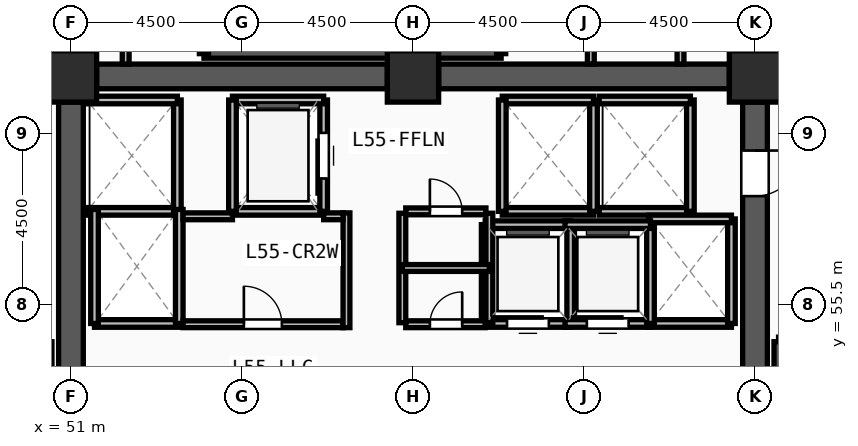
"""IFC4 building model, lengths in metres.
Left out: names, types, materials, properties, quantities, classifications, styles, units other than length and angle.
Written with IfcOpenShell. Run it as: python <this file> out.ifc"""

import sys

from ifc_helpers import new_model, si_unit, direction, frame, frame_2d, origin, origin_2d, place, context, subcontext, project, spatial, rectangle, extrude, source, transform, mapped, element, fill, save


model = new_model("IFC4")
c1 = context("Model", 3, precision=1e-05, world=origin(), true_north=direction((0.0, 1.0)))
c2 = subcontext(c1, "Body", "Model", "MODEL_VIEW")
j1 = project(units=[si_unit("LENGTHUNIT", "METRE"), si_unit("PLANEANGLEUNIT", "RADIAN")], contexts=[c1])
p1 = place(None, origin())
s1 = spatial("IfcSite", under=j1, at=p1, CompositionType="ELEMENT")
p2 = place(p1, origin())
s2 = spatial("IfcBuilding", under=s1, at=p2, CompositionType="ELEMENT")
p3 = place(p2, frame((0.0, 0.0, 213.0)))
s3 = spatial("IfcBuildingStorey", under=s2, at=p3, CompositionType="ELEMENT", Elevation=213.0)
m1 = source(origin(), c2, "Body", "SweptSolid", [
    extrude(rectangle(XDim=1.35, YDim=1.35, at=origin_2d()), origin(), (0.0, 0.0, 1.0), 3.75),
])
for number, where, z_axis, x_axis in (
    (1, (69.0, 61.5, 0.0), (0.0, 0.0, 1.0), (1.0, 0.0, 0.0)),
    (2, (60.0, 61.5, 0.0), (0.0, 0.0, 1.0), (1.0, 0.0, 0.0)),
    (3, (51.0, 61.5, 0.0), (0.0, 0.0, 1.0), (1.0, 0.0, 0.0)),
):
    element("IfcColumn", number, at=place(p3, frame(where, z_axis=z_axis, x_axis=x_axis)), inside=s3, PredefinedType="COLUMN", context=c2, shape_type="MappedRepresentation", body=[
        mapped(m1, transform((0.0, 0.0, 0.0), x_axis=(1.0, 0.0, 0.0), y_axis=(0.0, 1.0, 0.0), z_axis=(0.0, 0.0, 1.0), scale=1.0)),
    ])
for number, where, z_axis, x_axis in (
    (4, (51.675, 61.5, 0.0), (0.0, 0.0, 1.0), (1.0, 0.0, 0.0)),
    (5, (60.675, 61.5, 0.0), (0.0, 0.0, 1.0), (1.0, 0.0, 0.0)),
):
    element("IfcWall", number, at=place(p3, frame(where, z_axis=z_axis, x_axis=x_axis)), inside=s3, PredefinedType="SHEAR", context=c2, shape_type="SweptSolid", body=[
        extrude(rectangle(XDim=7.65, YDim=0.65, at=frame_2d((3.825, 0.0))), origin(), (0.0, 0.0, 1.0), 3.57),
    ])
p4 = place(p3, frame((69.0, 60.825, 0.0), z_axis=(0.0, 0.0, 1.0), x_axis=(0.0, -1.0, 0.0)))
e6 = element("IfcWall", 6, at=p4, inside=s3, PredefinedType="SHEAR", context=c2, shape_type="SweptSolid", body=[
    extrude(rectangle(XDim=13.65, YDim=0.65, at=frame_2d((6.825, 0.0))), origin(), (0.0, 0.0, 1.0), 3.57),
])
m2 = source(origin(), c2, "Body", "SweptSolid", [
    extrude(rectangle(XDim=1.2, YDim=2.2, at=frame_2d((0.6, 1.1))), frame((0.0, 0.335, 0.0), z_axis=(0.0, -1.0, 0.0), x_axis=(1.0, 0.0, 0.0)), (0.0, 0.0, 1.0), 0.67),
])
p5 = place(p4, frame((1.275, 0.0, 0.0)))
e7 = element("IfcOpeningElement", 7, at=p5, cuts=e6, PredefinedType="OPENING", context=c2, shape_type="MappedRepresentation", body=[
    mapped(m2, transform((0.0, 0.0, 0.0), x_axis=(1.0, 0.0, 0.0), y_axis=(0.0, 1.0, 0.0), z_axis=(0.0, 0.0, 1.0), scale=1.0)),
])
p6 = place(p3, frame((51.0, 47.175, 0.0), z_axis=(0.0, 0.0, 1.0), x_axis=(0.0, 1.0, 0.0)))
e8 = element("IfcWall", 8, at=p6, inside=s3, PredefinedType="SHEAR", context=c2, shape_type="SweptSolid", body=[
    extrude(rectangle(XDim=13.65, YDim=0.65, at=frame_2d((6.825, 0.0))), origin(), (0.0, 0.0, 1.0), 3.57),
])
for number, where, z_axis, x_axis in (
    (9, (69.62, 54.52, 0.0), (0.0, 0.0, 1.0), (0.0, -1.0, 0.0)),
    (10, (54.5, 62.1, 0.0), (0.0, 0.0, 1.0), (1.0, 0.0, 0.0)),
):
    element("IfcWall", number, at=place(p3, frame(where, z_axis=z_axis, x_axis=x_axis)), inside=s3, PredefinedType="SOLIDWALL", context=c2, shape_type="SweptSolid", body=[
        extrude(rectangle(XDim=7.82, YDim=0.24, at=frame_2d((3.91, 0.0))), origin(), (0.0, 0.0, 1.0), 3.57),
    ])
for number, where, z_axis, x_axis in (
    (11, (62.32, 62.1, 0.0), (0.0, 0.0, 1.0), (0.0, 1.0, 0.0)),
    (12, (54.5, 65.54, 0.0), (0.0, 0.0, 1.0), (0.0, -1.0, 0.0)),
):
    element("IfcWall", number, at=place(p3, frame(where, z_axis=z_axis, x_axis=x_axis)), inside=s3, PredefinedType="SOLIDWALL", context=c2, shape_type="SweptSolid", body=[
        extrude(rectangle(XDim=3.44, YDim=0.24, at=frame_2d((1.72, 0.0))), origin(), (0.0, 0.0, 1.0), 3.57),
    ])
p7 = place(p3, frame((55.25, 57.95, 0.0), z_axis=(0.0, 0.0, 1.0), x_axis=(1.0, 0.0, 0.0)))
e13 = element("IfcWall", 13, at=p7, inside=s3, PredefinedType="SOLIDWALL", context=c2, shape_type="SweptSolid", body=[
    extrude(rectangle(XDim=2.4, YDim=0.2, at=frame_2d((1.2, 0.0))), origin(), (0.0, 0.0, 1.0), 3.57),
])
p8 = place(p3, frame((57.65, 57.95, 0.0), z_axis=(0.0, 0.0, 1.0), x_axis=(0.0, 1.0, 0.0)))
e14 = element("IfcWall", 14, at=p8, inside=s3, PredefinedType="SOLIDWALL", context=c2, shape_type="SweptSolid", body=[
    extrude(rectangle(XDim=2.93, YDim=0.2, at=frame_2d((1.465, 0.0))), origin(), (0.0, 0.0, 1.0), 3.57),
])
m3 = source(origin(), c2, "Body", "SweptSolid", [
    extrude(rectangle(XDim=1.2, YDim=2.3, at=frame_2d((0.6, 1.15))), frame((0.0, 0.11, 0.0), z_axis=(0.0, -1.0, 0.0), x_axis=(1.0, 0.0, 0.0)), (0.0, 0.0, 1.0), 0.22),
])
p9 = place(p8, frame((0.865, 0.0, 0.0)))
e15 = element("IfcOpeningElement", 15, at=p9, cuts=e14, PredefinedType="OPENING", context=c2, shape_type="MappedRepresentation", body=[
    mapped(m3, transform((0.0, 0.0, 0.0), x_axis=(1.0, 0.0, 0.0), y_axis=(0.0, 1.0, 0.0), z_axis=(0.0, 0.0, 1.0), scale=1.0)),
])
p10 = place(p3, frame((57.65, 60.88, 0.0), z_axis=(0.0, 0.0, 1.0), x_axis=(-1.0, 0.0, 0.0)))
e16 = element("IfcWall", 16, at=p10, inside=s3, PredefinedType="SOLIDWALL", context=c2, shape_type="SweptSolid", body=[
    extrude(rectangle(XDim=2.4, YDim=0.2, at=frame_2d((1.2, 0.0))), origin(), (0.0, 0.0, 1.0), 3.57),
])
p11 = place(p3, frame((55.25, 60.88, 0.0), z_axis=(0.0, 0.0, 1.0), x_axis=(0.0, -1.0, 0.0)))
e17 = element("IfcWall", 17, at=p11, inside=s3, PredefinedType="SOLIDWALL", context=c2, shape_type="SweptSolid", body=[
    extrude(rectangle(XDim=2.93, YDim=0.2, at=frame_2d((1.465, 0.0))), origin(), (0.0, 0.0, 1.0), 3.57),
])
p12 = place(p3, frame((62.35, 57.95, 0.0), z_axis=(0.0, 0.0, 1.0), x_axis=(1.0, 0.0, 0.0)))
e18 = element("IfcWall", 18, at=p12, inside=s3, PredefinedType="SOLIDWALL", context=c2, shape_type="SweptSolid", body=[
    extrude(rectangle(XDim=2.4, YDim=0.2, at=frame_2d((1.2, 0.0))), origin(), (0.0, 0.0, 1.0), 3.57),
])
p13 = place(p3, frame((64.75, 57.95, 0.0), z_axis=(0.0, 0.0, 1.0), x_axis=(0.0, 1.0, 0.0)))
e19 = element("IfcWall", 19, at=p13, inside=s3, PredefinedType="SOLIDWALL", context=c2, shape_type="SweptSolid", body=[
    extrude(rectangle(XDim=2.93, YDim=0.2, at=frame_2d((1.465, 0.0))), origin(), (0.0, 0.0, 1.0), 3.57),
])
p14 = place(p3, frame((64.75, 60.88, 0.0), z_axis=(0.0, 0.0, 1.0), x_axis=(-1.0, 0.0, 0.0)))
e20 = element("IfcWall", 20, at=p14, inside=s3, PredefinedType="SOLIDWALL", context=c2, shape_type="SweptSolid", body=[
    extrude(rectangle(XDim=2.4, YDim=0.2, at=frame_2d((1.2, 0.0))), origin(), (0.0, 0.0, 1.0), 3.57),
])
p15 = place(p3, frame((62.35, 60.88, 0.0), z_axis=(0.0, 0.0, 1.0), x_axis=(0.0, -1.0, 0.0)))
e21 = element("IfcWall", 21, at=p15, inside=s3, PredefinedType="SOLIDWALL", context=c2, shape_type="SweptSolid", body=[
    extrude(rectangle(XDim=2.93, YDim=0.2, at=frame_2d((1.465, 0.0))), origin(), (0.0, 0.0, 1.0), 3.57),
])
p16 = place(p3, frame((64.9, 57.95, 0.0), z_axis=(0.0, 0.0, 1.0), x_axis=(1.0, 0.0, 0.0)))
e22 = element("IfcWall", 22, at=p16, inside=s3, PredefinedType="SOLIDWALL", context=c2, shape_type="SweptSolid", body=[
    extrude(rectangle(XDim=2.4, YDim=0.2, at=frame_2d((1.2, 0.0))), origin(), (0.0, 0.0, 1.0), 3.57),
])
p17 = place(p3, frame((67.3, 57.95, 0.0), z_axis=(0.0, 0.0, 1.0), x_axis=(0.0, 1.0, 0.0)))
e23 = element("IfcWall", 23, at=p17, inside=s3, PredefinedType="SOLIDWALL", context=c2, shape_type="SweptSolid", body=[
    extrude(rectangle(XDim=2.93, YDim=0.2, at=frame_2d((1.465, 0.0))), origin(), (0.0, 0.0, 1.0), 3.57),
])
for number, where, z_axis, x_axis in (
    (24, (67.3, 60.88, 0.0), (0.0, 0.0, 1.0), (-1.0, 0.0, 0.0)),
    (25, (51.4, 57.95, 0.0), (0.0, 0.0, 1.0), (1.0, 0.0, 0.0)),
):
    element("IfcWall", number, at=place(p3, frame(where, z_axis=z_axis, x_axis=x_axis)), inside=s3, PredefinedType="SOLIDWALL", context=c2, shape_type="SweptSolid", body=[
        extrude(rectangle(XDim=2.4, YDim=0.2, at=frame_2d((1.2, 0.0))), origin(), (0.0, 0.0, 1.0), 3.57),
    ])
p18 = place(p3, frame((53.8, 57.95, 0.0), z_axis=(0.0, 0.0, 1.0), x_axis=(0.0, 1.0, 0.0)))
e26 = element("IfcWall", 26, at=p18, inside=s3, PredefinedType="SOLIDWALL", context=c2, shape_type="SweptSolid", body=[
    extrude(rectangle(XDim=2.93, YDim=0.2, at=frame_2d((1.465, 0.0))), origin(), (0.0, 0.0, 1.0), 3.57),
])
p19 = place(p3, frame((53.8, 60.88, 0.0), z_axis=(0.0, 0.0, 1.0), x_axis=(-1.0, 0.0, 0.0)))
e27 = element("IfcWall", 27, at=p19, inside=s3, PredefinedType="SOLIDWALL", context=c2, shape_type="SweptSolid", body=[
    extrude(rectangle(XDim=2.4, YDim=0.2, at=frame_2d((1.2, 0.0))), origin(), (0.0, 0.0, 1.0), 3.57),
])
p20 = place(p3, frame((51.62, 55.0, 0.0), z_axis=(0.0, 0.0, 1.0), x_axis=(1.0, 0.0, 0.0)))
e28 = element("IfcWall", 28, at=p20, inside=s3, PredefinedType="SOLIDWALL", context=c2, shape_type="SweptSolid", body=[
    extrude(rectangle(XDim=2.23, YDim=0.2, at=frame_2d((1.115, 0.0))), origin(), (0.0, 0.0, 1.0), 3.57),
])
for number, where, z_axis, x_axis in (
    (29, (53.85, 55.0, 0.0), (0.0, 0.0, 1.0), (0.0, 1.0, 0.0)),
    (30, (51.62, 58.0, 0.0), (0.0, 0.0, 1.0), (0.0, -1.0, 0.0)),
):
    element("IfcWall", number, at=place(p3, frame(where, z_axis=z_axis, x_axis=x_axis)), inside=s3, PredefinedType="SOLIDWALL", context=c2, shape_type="SweptSolid", body=[
        extrude(rectangle(XDim=3.0, YDim=0.2, at=frame_2d((1.5, 0.0))), origin(), (0.0, 0.0, 1.0), 3.57),
    ])
p21 = place(p3, frame((66.2, 55.0, 0.0), z_axis=(0.0, 0.0, 1.0), x_axis=(1.0, 0.0, 0.0)))
e31 = element("IfcWall", 31, at=p21, inside=s3, PredefinedType="SOLIDWALL", context=c2, shape_type="SweptSolid", body=[
    extrude(rectangle(XDim=2.18, YDim=0.2, at=frame_2d((1.09, 0.0))), origin(), (0.0, 0.0, 1.0), 3.57),
])
p22 = place(p3, frame((68.38, 55.0, 0.0), z_axis=(0.0, 0.0, 1.0), x_axis=(0.0, 1.0, 0.0)))
e32 = element("IfcWall", 32, at=p22, inside=s3, PredefinedType="SOLIDWALL", context=c2, shape_type="SweptSolid", body=[
    extrude(rectangle(XDim=2.75, YDim=0.2, at=frame_2d((1.375, 0.0))), origin(), (0.0, 0.0, 1.0), 3.57),
])
p23 = place(p3, frame((68.38, 57.75, 0.0), z_axis=(0.0, 0.0, 1.0), x_axis=(-1.0, 0.0, 0.0)))
e33 = element("IfcWall", 33, at=p23, inside=s3, PredefinedType="SOLIDWALL", context=c2, shape_type="SweptSolid", body=[
    extrude(rectangle(XDim=2.18, YDim=0.2, at=frame_2d((1.09, 0.0))), origin(), (0.0, 0.0, 1.0), 3.57),
])
p24 = place(p3, frame((61.9, 55.0, 0.0), z_axis=(0.0, 0.0, 1.0), x_axis=(1.0, 0.0, 0.0)))
e34 = element("IfcWall", 34, at=p24, inside=s3, PredefinedType="SOLIDWALL", context=c2, shape_type="SweptSolid", body=[
    extrude(rectangle(XDim=2.25, YDim=0.2, at=frame_2d((1.125, 0.0))), origin(), (0.0, 0.0, 1.0), 3.57),
])
m4 = source(origin(), c2, "Body", "SweptSolid", [
    extrude(rectangle(XDim=1.1, YDim=2.2, at=frame_2d((0.55, 1.1))), frame((0.0, 0.11, 0.0), z_axis=(0.0, -1.0, 0.0), x_axis=(1.0, 0.0, 0.0)), (0.0, 0.0, 1.0), 0.22),
])
p25 = place(p24, frame((0.575, 0.0, 0.0)))
e35 = element("IfcOpeningElement", 35, at=p25, cuts=e34, PredefinedType="OPENING", context=c2, shape_type="MappedRepresentation", body=[
    mapped(m4, transform((0.0, 0.0, 0.0), x_axis=(1.0, 0.0, 0.0), y_axis=(0.0, 1.0, 0.0), z_axis=(0.0, 0.0, 1.0), scale=1.0)),
])
p26 = place(p3, frame((64.15, 55.0, 0.0), z_axis=(0.0, 0.0, 1.0), x_axis=(0.0, 1.0, 0.0)))
e36 = element("IfcWall", 36, at=p26, inside=s3, PredefinedType="SOLIDWALL", context=c2, shape_type="SweptSolid", body=[
    extrude(rectangle(XDim=2.6, YDim=0.2, at=frame_2d((1.3, 0.0))), origin(), (0.0, 0.0, 1.0), 3.57),
])
p27 = place(p3, frame((64.15, 57.6, 0.0), z_axis=(0.0, 0.0, 1.0), x_axis=(-1.0, 0.0, 0.0)))
e37 = element("IfcWall", 37, at=p27, inside=s3, PredefinedType="SOLIDWALL", context=c2, shape_type="SweptSolid", body=[
    extrude(rectangle(XDim=2.25, YDim=0.2, at=frame_2d((1.125, 0.0))), origin(), (0.0, 0.0, 1.0), 3.57),
])
p28 = place(p3, frame((61.9, 57.6, 0.0), z_axis=(0.0, 0.0, 1.0), x_axis=(0.0, -1.0, 0.0)))
e38 = element("IfcWall", 38, at=p28, inside=s3, PredefinedType="SOLIDWALL", context=c2, shape_type="SweptSolid", body=[
    extrude(rectangle(XDim=2.6, YDim=0.2, at=frame_2d((1.3, 0.0))), origin(), (0.0, 0.0, 1.0), 3.57),
])
p29 = place(p3, frame((64.0, 55.0, 0.0), z_axis=(0.0, 0.0, 1.0), x_axis=(1.0, 0.0, 0.0)))
e39 = element("IfcWall", 39, at=p29, inside=s3, PredefinedType="SOLIDWALL", context=c2, shape_type="SweptSolid", body=[
    extrude(rectangle(XDim=2.25, YDim=0.2, at=frame_2d((1.125, 0.0))), origin(), (0.0, 0.0, 1.0), 3.57),
])
p30 = place(p29, frame((0.575, 0.0, 0.0)))
e40 = element("IfcOpeningElement", 40, at=p30, cuts=e39, PredefinedType="OPENING", context=c2, shape_type="MappedRepresentation", body=[
    mapped(m4, transform((0.0, 0.0, 0.0), x_axis=(1.0, 0.0, 0.0), y_axis=(0.0, 1.0, 0.0), z_axis=(0.0, 0.0, 1.0), scale=1.0)),
])
p31 = place(p3, frame((66.25, 55.0, 0.0), z_axis=(0.0, 0.0, 1.0), x_axis=(0.0, 1.0, 0.0)))
e41 = element("IfcWall", 41, at=p31, inside=s3, PredefinedType="SOLIDWALL", context=c2, shape_type="SweptSolid", body=[
    extrude(rectangle(XDim=2.6, YDim=0.2, at=frame_2d((1.3, 0.0))), origin(), (0.0, 0.0, 1.0), 3.57),
])
p32 = place(p3, frame((66.25, 57.6, 0.0), z_axis=(0.0, 0.0, 1.0), x_axis=(-1.0, 0.0, 0.0)))
e42 = element("IfcWall", 42, at=p32, inside=s3, PredefinedType="SOLIDWALL", context=c2, shape_type="SweptSolid", body=[
    extrude(rectangle(XDim=2.25, YDim=0.2, at=frame_2d((1.125, 0.0))), origin(), (0.0, 0.0, 1.0), 3.57),
])
p33 = place(p3, frame((53.95, 54.98, 0.0), z_axis=(0.0, 0.0, 1.0), x_axis=(1.0, 0.0, 0.0)))
e43 = element("IfcWall", 43, at=p33, inside=s3, PredefinedType="PARTITIONING", context=c2, shape_type="SweptSolid", body=[
    extrude(rectangle(XDim=4.21, YDim=0.18, at=frame_2d((2.105, 0.0))), origin(), (0.0, 0.0, 1.0), 3.57),
])
m5 = source(origin(), c2, "Body", "SweptSolid", [
    extrude(rectangle(XDim=1.0, YDim=2.2, at=frame_2d((0.5, 1.1))), frame((0.0, 0.1, 0.0), z_axis=(0.0, -1.0, 0.0), x_axis=(1.0, 0.0, 0.0)), (0.0, 0.0, 1.0), 0.2),
])
p34 = place(p33, frame((1.6, 0.0, 0.0)))
e44 = element("IfcOpeningElement", 44, at=p34, cuts=e43, PredefinedType="OPENING", context=c2, shape_type="MappedRepresentation", body=[
    mapped(m5, transform((0.0, 0.0, 0.0), x_axis=(1.0, 0.0, 0.0), y_axis=(0.0, 1.0, 0.0), z_axis=(0.0, 0.0, 1.0), scale=1.0)),
])
p35 = place(p3, frame((59.81, 54.98, 0.0), z_axis=(0.0, 0.0, 1.0), x_axis=(1.0, 0.0, 0.0)))
e45 = element("IfcWall", 45, at=p35, inside=s3, PredefinedType="PARTITIONING", context=c2, shape_type="SweptSolid", body=[
    extrude(rectangle(XDim=2.09, YDim=0.18, at=frame_2d((1.045, 0.0))), origin(), (0.0, 0.0, 1.0), 3.57),
])
m6 = source(origin(), c2, "Body", "SweptSolid", [
    extrude(rectangle(XDim=0.85, YDim=2.1, at=frame_2d((0.425, 1.05))), frame((0.0, 0.1, 0.0), z_axis=(0.0, -1.0, 0.0), x_axis=(1.0, 0.0, 0.0)), (0.0, 0.0, 1.0), 0.2),
])
p36 = place(p35, frame((0.635, 0.0, 0.0)))
e46 = element("IfcOpeningElement", 46, at=p36, cuts=e45, PredefinedType="OPENING", context=c2, shape_type="MappedRepresentation", body=[
    mapped(m6, transform((0.0, 0.0, 0.0), x_axis=(1.0, 0.0, 0.0), y_axis=(0.0, 1.0, 0.0), z_axis=(0.0, 0.0, 1.0), scale=1.0)),
])
p37 = place(p3, frame((59.81, 57.95, 0.0), z_axis=(0.0, 0.0, 1.0), x_axis=(1.0, 0.0, 0.0)))
e47 = element("IfcWall", 47, at=p37, inside=s3, PredefinedType="PARTITIONING", context=c2, shape_type="SweptSolid", body=[
    extrude(rectangle(XDim=2.11, YDim=0.18, at=frame_2d((1.055, 0.0))), origin(), (0.0, 0.0, 1.0), 3.57),
])
p38 = place(p37, frame((0.635, 0.0, 0.0)))
e48 = element("IfcOpeningElement", 48, at=p38, cuts=e47, PredefinedType="OPENING", context=c2, shape_type="MappedRepresentation", body=[
    mapped(m6, transform((0.0, 0.0, 0.0), x_axis=(1.0, 0.0, 0.0), y_axis=(0.0, 1.0, 0.0), z_axis=(0.0, 0.0, 1.0), scale=1.0)),
])
for number, where, z_axis, x_axis in (
    (49, (59.72, 55.02, 0.0), (0.0, 0.0, 1.0), (0.0, 1.0, 0.0)),
    (50, (62.01, 55.02, 0.0), (0.0, 0.0, 1.0), (0.0, 1.0, 0.0)),
):
    element("IfcWall", number, at=place(p3, frame(where, z_axis=z_axis, x_axis=x_axis)), inside=s3, PredefinedType="PARTITIONING", context=c2, shape_type="SweptSolid", body=[
        extrude(rectangle(XDim=2.88, YDim=0.18, at=frame_2d((1.44, 0.0))), origin(), (0.0, 0.0, 1.0), 3.57),
    ])
p39 = place(p3, frame((59.72, 56.46, 0.0), z_axis=(0.0, 0.0, 1.0), x_axis=(1.0, 0.0, 0.0)))
e51 = element("IfcWall", 51, at=p39, inside=s3, PredefinedType="PARTITIONING", context=c2, shape_type="SweptSolid", body=[
    extrude(rectangle(XDim=2.29, YDim=0.18, at=frame_2d((1.145, 0.0))), origin(), (0.0, 0.0, 1.0), 3.57),
])
p40 = place(p3, frame((50.54, 61.95, 0.0), z_axis=(0.0, 0.0, 1.0), x_axis=(0.0, 1.0, 0.0)))
e52 = element("IfcWall", 52, at=p40, inside=s3, PredefinedType="PARTITIONING", context=c2, shape_type="SweptSolid", body=[
    extrude(rectangle(XDim=3.63, YDim=0.18, at=frame_2d((1.815, 0.0))), origin(), (0.0, 0.0, 1.0), 3.57),
])
for number, where, z_axis, x_axis in (
    (53, (52.44, 61.825, 0.0), (0.0, 0.0, 1.0), (0.0, 1.0, 0.0)),
    (54, (64.68, 61.825, 0.0), (0.0, 0.0, 1.0), (0.0, 1.0, 0.0)),
    (55, (67.04, 61.825, 0.0), (0.0, 0.0, 1.0), (0.0, 1.0, 0.0)),
):
    element("IfcWall", number, at=place(p3, frame(where, z_axis=z_axis, x_axis=x_axis)), inside=s3, PredefinedType="PARTITIONING", context=c2, shape_type="SweptSolid", body=[
        extrude(rectangle(XDim=3.755, YDim=0.18, at=frame_2d((1.877, 0.0))), origin(), (0.0, 0.0, 1.0), 3.57),
    ])
p41 = place(p3, frame((69.46, 61.95, 0.0), z_axis=(0.0, 0.0, 1.0), x_axis=(0.0, 1.0, 0.0)))
e56 = element("IfcWall", 56, at=p41, inside=s3, PredefinedType="PARTITIONING", context=c2, shape_type="SweptSolid", body=[
    extrude(rectangle(XDim=3.63, YDim=0.18, at=frame_2d((1.815, 0.0))), origin(), (0.0, 0.0, 1.0), 3.57),
])
p42 = place(p3, frame((58.25, 54.89, 0.0), z_axis=(0.0, 0.0, 1.0), x_axis=(0.0, 1.0, 0.0)))
e57 = element("IfcWall", 57, at=p42, inside=s3, PredefinedType="PARTITIONING", context=c2, shape_type="SweptSolid", body=[
    extrude(rectangle(XDim=3.02, YDim=0.18, at=frame_2d((1.51, 0.0))), origin(), (0.0, 0.0, 1.0), 3.57),
])
p43 = place(p3, frame((53.95, 57.82, 0.0), z_axis=(0.0, 0.0, 1.0), x_axis=(1.0, 0.0, 0.0)))
e58 = element("IfcWall", 58, at=p43, inside=s3, PredefinedType="PARTITIONING", context=c2, shape_type="SweptSolid", body=[
    extrude(rectangle(XDim=1.3, YDim=0.18, at=frame_2d((0.65, 0.0))), origin(), (0.0, 0.0, 1.0), 3.57),
])
p44 = place(p3, frame((57.65, 57.82, 0.0), z_axis=(0.0, 0.0, 1.0), x_axis=(1.0, 0.0, 0.0)))
e59 = element("IfcWall", 59, at=p44, inside=s3, PredefinedType="PARTITIONING", context=c2, shape_type="SweptSolid", body=[
    extrude(rectangle(XDim=0.51, YDim=0.18, at=frame_2d((0.255, 0.0))), origin(), (0.0, 0.0, 1.0), 3.57),
])
m7 = source(origin(), c2, "Body", "SweptSolid", [
    extrude(rectangle(XDim=1.2, YDim=2.2, at=frame_2d((0.6, 1.1))), frame((0.0, 0.025, 0.0), z_axis=(0.0, -1.0, 0.0), x_axis=(1.0, 0.0, 0.0)), (0.0, 0.0, 1.0), 0.05),
])
p45 = place(p5, origin())
e60 = element("IfcDoor", 60, at=p45, inside=s3, OperationType="SINGLE_SWING_LEFT", PredefinedType="DOOR", context=c2, shape_type="MappedRepresentation", body=[
    mapped(m7, transform((0.0, 0.0, 0.0), x_axis=(1.0, 0.0, 0.0), y_axis=(0.0, 1.0, 0.0), z_axis=(0.0, 0.0, 1.0), scale=1.0)),
])
fill(e7, e60)
m8 = source(origin(), c2, "Body", "SweptSolid", [
    extrude(rectangle(XDim=1.2, YDim=2.3, at=frame_2d((0.6, 1.15))), frame((0.0, 0.025, 0.0), z_axis=(0.0, -1.0, 0.0), x_axis=(1.0, 0.0, 0.0)), (0.0, 0.0, 1.0), 0.05),
])
p46 = place(p9, origin())
e61 = element("IfcDoor", 61, at=p46, inside=s3, OperationType="SLIDING_TO_LEFT", PredefinedType="DOOR", context=c2, shape_type="MappedRepresentation", body=[
    mapped(m8, transform((0.0, 0.0, 0.0), x_axis=(1.0, 0.0, 0.0), y_axis=(0.0, 1.0, 0.0), z_axis=(0.0, 0.0, 1.0), scale=1.0)),
])
fill(e15, e61)
m9 = source(origin(), c2, "Body", "SweptSolid", [
    extrude(rectangle(XDim=1.1, YDim=2.2, at=frame_2d((0.55, 1.1))), frame((0.0, 0.025, 0.0), z_axis=(0.0, -1.0, 0.0), x_axis=(1.0, 0.0, 0.0)), (0.0, 0.0, 1.0), 0.05),
])
p47 = place(p25, origin())
e62 = element("IfcDoor", 62, at=p47, inside=s3, OperationType="SLIDING_TO_LEFT", PredefinedType="DOOR", context=c2, shape_type="MappedRepresentation", body=[
    mapped(m9, transform((0.0, 0.0, 0.0), x_axis=(1.0, 0.0, 0.0), y_axis=(0.0, 1.0, 0.0), z_axis=(0.0, 0.0, 1.0), scale=1.0)),
])
fill(e35, e62)
p48 = place(p30, origin())
e63 = element("IfcDoor", 63, at=p48, inside=s3, OperationType="SLIDING_TO_LEFT", PredefinedType="DOOR", context=c2, shape_type="MappedRepresentation", body=[
    mapped(m9, transform((0.0, 0.0, 0.0), x_axis=(1.0, 0.0, 0.0), y_axis=(0.0, 1.0, 0.0), z_axis=(0.0, 0.0, 1.0), scale=1.0)),
])
fill(e40, e63)
m10 = source(origin(), c2, "Body", "SweptSolid", [
    extrude(rectangle(XDim=1.0, YDim=2.2, at=frame_2d((0.5, 1.1))), frame((0.0, 0.025, 0.0), z_axis=(0.0, -1.0, 0.0), x_axis=(1.0, 0.0, 0.0)), (0.0, 0.0, 1.0), 0.05),
])
p49 = place(p34, origin())
e64 = element("IfcDoor", 64, at=p49, inside=s3, OperationType="SINGLE_SWING_LEFT", PredefinedType="DOOR", context=c2, shape_type="MappedRepresentation", body=[
    mapped(m10, transform((0.0, 0.0, 0.0), x_axis=(1.0, 0.0, 0.0), y_axis=(0.0, 1.0, 0.0), z_axis=(0.0, 0.0, 1.0), scale=1.0)),
])
fill(e44, e64)
m11 = source(origin(), c2, "Body", "SweptSolid", [
    extrude(rectangle(XDim=0.85, YDim=2.1, at=frame_2d((0.425, 1.05))), frame((0.0, 0.025, 0.0), z_axis=(0.0, -1.0, 0.0), x_axis=(1.0, 0.0, 0.0)), (0.0, 0.0, 1.0), 0.05),
])
p50 = place(p36, origin())
e65 = element("IfcDoor", 65, at=p50, inside=s3, OperationType="SINGLE_SWING_RIGHT", PredefinedType="DOOR", context=c2, shape_type="MappedRepresentation", body=[
    mapped(m11, transform((0.0, 0.0, 0.0), x_axis=(1.0, 0.0, 0.0), y_axis=(0.0, 1.0, 0.0), z_axis=(0.0, 0.0, 1.0), scale=1.0)),
])
fill(e46, e65)
p51 = place(p38, origin())
e66 = element("IfcDoor", 66, at=p51, inside=s3, OperationType="SINGLE_SWING_LEFT", PredefinedType="DOOR", context=c2, shape_type="MappedRepresentation", body=[
    mapped(m11, transform((0.0, 0.0, 0.0), x_axis=(1.0, 0.0, 0.0), y_axis=(0.0, 1.0, 0.0), z_axis=(0.0, 0.0, 1.0), scale=1.0)),
])
fill(e48, e66)
save(model, sys.argv[1])
